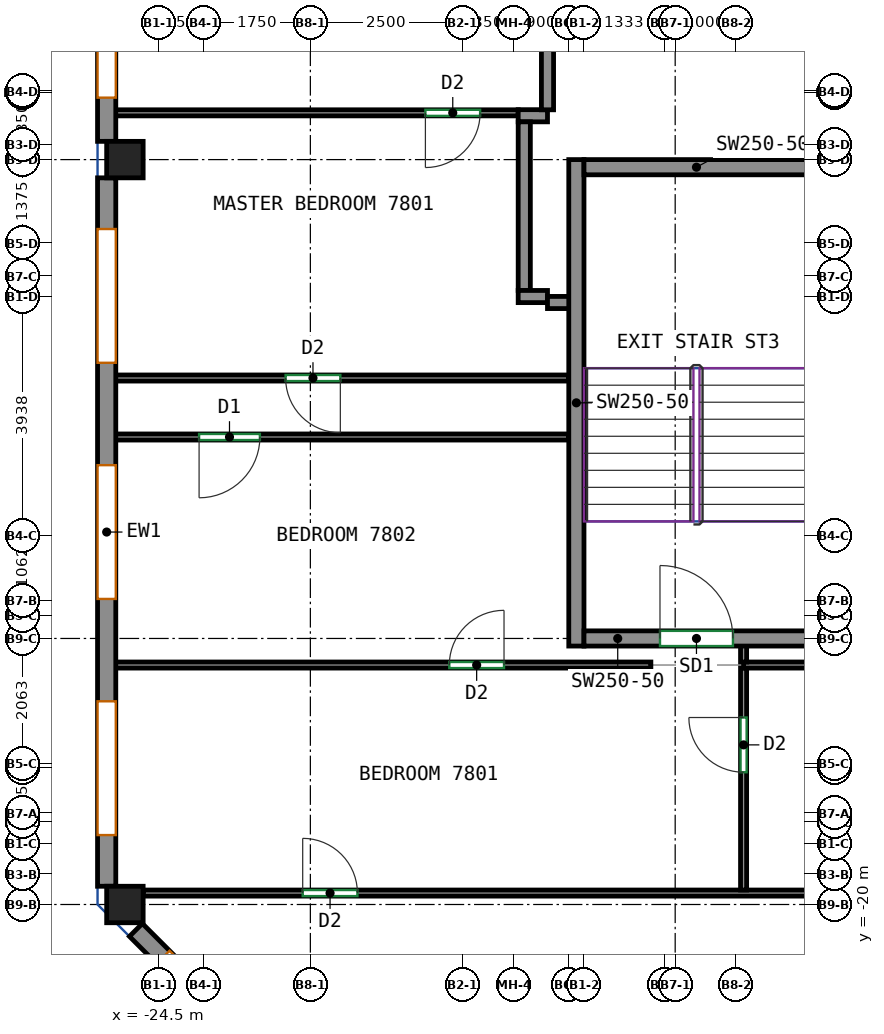
"""IFC4 building model, lengths in metres.
Left out: names, types, materials, properties, quantities, classifications, styles, units other than length and angle.
Written with IfcOpenShell. Run it as: python <this file> out.ifc"""

import sys

from ifc_helpers import new_model, si_unit, direction, frame, frame_2d, origin, origin_2d, place, context, subcontext, project, spatial, rectangle, extrude, source, transform, mapped, element, fill, save


model = new_model("IFC4")
c1 = context("Model", 3, precision=1e-05, world=origin(), true_north=direction((0.0, 1.0)))
c2 = subcontext(c1, "Body", "Model", "MODEL_VIEW")
j1 = project(units=[si_unit("LENGTHUNIT", "METRE"), si_unit("PLANEANGLEUNIT", "RADIAN")], contexts=[c1])
p1 = place(None, origin())
s1 = spatial("IfcSite", under=j1, at=p1, CompositionType="ELEMENT")
p2 = place(p1, origin())
s2 = spatial("IfcBuilding", under=s1, at=p2, CompositionType="ELEMENT")
p3 = place(p2, frame((0.0, 0.0, 312.0)))
s3 = spatial("IfcBuildingStorey", under=s2, at=p3, CompositionType="ELEMENT", Elevation=312.0)
m1 = source(origin(), c2, "Body", "SweptSolid", [
    extrude(rectangle(XDim=0.6, YDim=0.6, at=origin_2d()), origin(), (0.0, 0.0, 1.0), 3.12),
])
for number, where, z_axis, x_axis in (
    (1, (-25.05, -20.0, 0.0), (0.0, 0.0, 1.0), (1.0, 0.0, 0.0)),
    (2, (-25.05, -7.75, 0.0), (0.0, 0.0, 1.0), (1.0, 0.0, 0.0)),
):
    element("IfcColumn", number, at=place(p3, frame(where, z_axis=z_axis, x_axis=x_axis)), inside=s3, PredefinedType="COLUMN", context=c2, shape_type="MappedRepresentation", body=[
        mapped(m1, transform((0.0, 0.0, 0.0))),
    ])
m2 = source(origin(), c2, "Body", "SweptSolid", [
    extrude(rectangle(XDim=8.0, YDim=0.25, at=frame_2d((4.0, 0.0))), origin(), (0.0, 0.0, 1.0), 3.12),
])
p4 = place(p3, frame((-17.625, -15.75, 0.0), z_axis=(0.0, 0.0, 1.0), x_axis=(0.0, 1.0, 0.0)))
e3 = element("IfcWall", 3, at=p4, inside=s3, PredefinedType="SHEAR", context=c2, shape_type="MappedRepresentation", body=[
    mapped(m2, transform((0.0, 0.0, 0.0))),
])
m3 = source(origin(), c2, "Body", "SweptSolid", [
    extrude(rectangle(XDim=3.7, YDim=0.25, at=frame_2d((1.85, 0.0))), origin(), (0.0, 0.0, 1.0), 3.12),
])
p5 = place(p3, frame((-17.5, -15.625, 0.0), z_axis=(0.0, 0.0, 1.0), x_axis=(1.0, 0.0, 0.0)))
e4 = element("IfcWall", 4, at=p5, inside=s3, PredefinedType="SHEAR", context=c2, shape_type="MappedRepresentation", body=[
    mapped(m3, transform((0.0, 0.0, 0.0))),
])
p6 = place(p5, frame((1.25, 0.0, 0.0)))
e5 = element("IfcOpeningElement", 5, at=p6, cuts=e4, PredefinedType="OPENING", context=c2, shape_type="SweptSolid", body=[
    extrude(rectangle(XDim=1.2, YDim=2.1, at=frame_2d((0.6, 1.05))), frame((0.0, 0.135, 0.0), z_axis=(0.0, -1.0, 0.0), x_axis=(1.0, 0.0, 0.0)), (0.0, 0.0, 1.0), 0.27),
])
p7 = place(p3, frame((-17.5, -7.875, 0.0), z_axis=(0.0, 0.0, 1.0), x_axis=(1.0, 0.0, 0.0)))
e6 = element("IfcWall", 6, at=p7, inside=s3, PredefinedType="SHEAR", context=c2, shape_type="MappedRepresentation", body=[
    mapped(m3, transform((0.0, 0.0, 0.0))),
])
m4 = source(origin(), c2, "Body", "SweptSolid", [
    extrude(rectangle(XDim=7.275, YDim=0.3, at=frame_2d((3.637, 0.0))), origin(), (0.0, 0.0, 1.0), 3.12),
])
p8 = place(p3, frame((-25.35, -0.175, 0.0), z_axis=(0.0, 0.0, 1.0), x_axis=(0.0, -1.0, 0.0)))
e7 = element("IfcWall", 7, at=p8, inside=s3, PredefinedType="SOLIDWALL", context=c2, shape_type="MappedRepresentation", body=[
    mapped(m4, transform((0.0, 0.0, 0.0))),
])
p9 = place(p8, frame((0.719, 0.0, 0.8)))
e8 = element("IfcOpeningElement", 8, at=p9, cuts=e7, PredefinedType="OPENING", context=c2, shape_type="SweptSolid", body=[
    extrude(rectangle(XDim=2.2, YDim=2.05, at=frame_2d((1.1, 1.025))), frame((0.0, 0.16, 0.0), z_axis=(0.0, -1.0, 0.0), x_axis=(1.0, 0.0, 0.0)), (0.0, 0.0, 1.0), 0.32),
])
p10 = place(p8, frame((4.356, 0.0, 0.8)))
e9 = element("IfcOpeningElement", 9, at=p10, cuts=e7, PredefinedType="OPENING", context=c2, shape_type="SweptSolid", body=[
    extrude(rectangle(XDim=2.2, YDim=2.05, at=frame_2d((1.1, 1.025))), frame((0.0, 0.16, 0.0), z_axis=(0.0, -1.0, 0.0), x_axis=(1.0, 0.0, 0.0)), (0.0, 0.0, 1.0), 0.32),
])
m5 = source(origin(), c2, "Body", "SweptSolid", [
    extrude(rectangle(XDim=11.65, YDim=0.3, at=frame_2d((5.825, 0.0))), origin(), (0.0, 0.0, 1.0), 3.12),
])
p11 = place(p3, frame((-25.35, -8.05, 0.0), z_axis=(0.0, 0.0, 1.0), x_axis=(0.0, -1.0, 0.0)))
e10 = element("IfcWall", 10, at=p11, inside=s3, PredefinedType="SOLIDWALL", context=c2, shape_type="MappedRepresentation", body=[
    mapped(m5, transform((0.0, 0.0, 0.0))),
])
p12 = place(p11, frame((0.842, 0.0, 0.8)))
e11 = element("IfcOpeningElement", 11, at=p12, cuts=e10, PredefinedType="OPENING", context=c2, shape_type="SweptSolid", body=[
    extrude(rectangle(XDim=2.2, YDim=2.05, at=frame_2d((1.1, 1.025))), frame((0.0, 0.16, 0.0), z_axis=(0.0, -1.0, 0.0), x_axis=(1.0, 0.0, 0.0)), (0.0, 0.0, 1.0), 0.32),
])
p13 = place(p11, frame((4.725, 0.0, 0.8)))
e12 = element("IfcOpeningElement", 12, at=p13, cuts=e10, PredefinedType="OPENING", context=c2, shape_type="SweptSolid", body=[
    extrude(rectangle(XDim=2.2, YDim=2.05, at=frame_2d((1.1, 1.025))), frame((0.0, 0.16, 0.0), z_axis=(0.0, -1.0, 0.0), x_axis=(1.0, 0.0, 0.0)), (0.0, 0.0, 1.0), 0.32),
])
p14 = place(p11, frame((8.608, 0.0, 0.8)))
e13 = element("IfcOpeningElement", 13, at=p14, cuts=e10, PredefinedType="OPENING", context=c2, shape_type="SweptSolid", body=[
    extrude(rectangle(XDim=2.2, YDim=2.05, at=frame_2d((1.1, 1.025))), frame((0.0, 0.16, 0.0), z_axis=(0.0, -1.0, 0.0), x_axis=(1.0, 0.0, 0.0)), (0.0, 0.0, 1.0), 0.32),
])
m6 = source(origin(), c2, "Body", "SweptSolid", [
    extrude(rectangle(XDim=3.465, YDim=0.3, at=frame_2d((1.732, 0.0))), origin(), (0.0, 0.0, 1.0), 3.12),
])
p15 = place(p3, frame((-24.869, -20.419, 0.0), z_axis=(0.0, 0.0, 1.0), x_axis=(0.707106781187, -0.707106781187, 0.0)))
e14 = element("IfcWall", 14, at=p15, inside=s3, PredefinedType="SOLIDWALL", context=c2, shape_type="MappedRepresentation", body=[
    mapped(m6, transform((0.0, 0.0, 0.0))),
])
p16 = place(p15, frame((0.632, 0.0, 0.8)))
e15 = element("IfcOpeningElement", 15, at=p16, cuts=e14, PredefinedType="OPENING", context=c2, shape_type="SweptSolid", body=[
    extrude(rectangle(XDim=2.2, YDim=2.05, at=frame_2d((1.1, 1.025))), frame((0.0, 0.16, 0.0), z_axis=(0.0, -1.0, 0.0), x_axis=(1.0, 0.0, 0.0)), (0.0, 0.0, 1.0), 0.32),
])
p17 = place(p3, frame((-24.75, -19.812, 0.0), z_axis=(0.0, 0.0, 1.0), x_axis=(1.0, 0.0, 0.0)))
e16 = element("IfcWall", 16, at=p17, inside=s3, PredefinedType="PARTITIONING", context=c2, shape_type="SweptSolid", body=[
    extrude(rectangle(XDim=20.35, YDim=0.1, at=frame_2d((10.175, 0.0))), origin(), (0.0, 0.0, 1.0), 3.12),
])
p18 = place(p17, frame((2.624, 0.0, 0.0)))
e17 = element("IfcOpeningElement", 17, at=p18, cuts=e16, PredefinedType="OPENING", context=c2, shape_type="SweptSolid", body=[
    extrude(rectangle(XDim=0.9, YDim=2.1, at=frame_2d((0.45, 1.05))), frame((0.0, 0.06, 0.0), z_axis=(0.0, -1.0, 0.0), x_axis=(1.0, 0.0, 0.0)), (0.0, 0.0, 1.0), 0.12),
])
p19 = place(p3, frame((-14.875, -19.762, 0.0), z_axis=(0.0, 0.0, 1.0), x_axis=(0.0, 1.0, 0.0)))
e18 = element("IfcWall", 18, at=p19, inside=s3, PredefinedType="PARTITIONING", context=c2, shape_type="SweptSolid", body=[
    extrude(rectangle(XDim=3.65, YDim=0.1, at=frame_2d((1.825, 0.0))), origin(), (0.0, 0.0, 1.0), 3.12),
])
p20 = place(p19, frame((1.937, 0.0, 0.0)))
e19 = element("IfcOpeningElement", 19, at=p20, cuts=e18, PredefinedType="OPENING", context=c2, shape_type="SweptSolid", body=[
    extrude(rectangle(XDim=0.9, YDim=2.1, at=frame_2d((0.45, 1.05))), frame((0.0, 0.06, 0.0), z_axis=(0.0, -1.0, 0.0), x_axis=(1.0, 0.0, 0.0)), (0.0, 0.0, 1.0), 0.12),
])
p21 = place(p3, frame((-25.25, -16.062, 0.0), z_axis=(0.0, 0.0, 1.0), x_axis=(1.0, 0.0, 0.0)))
e20 = element("IfcWall", 20, at=p21, inside=s3, PredefinedType="PARTITIONING", context=c2, shape_type="SweptSolid", body=[
    extrude(rectangle(XDim=8.85, YDim=0.1, at=frame_2d((4.425, 0.0))), origin(), (0.0, 0.0, 1.0), 3.12),
])
p22 = place(p21, frame((5.535, 0.0, 0.0)))
e21 = element("IfcOpeningElement", 21, at=p22, cuts=e20, PredefinedType="OPENING", context=c2, shape_type="SweptSolid", body=[
    extrude(rectangle(XDim=0.9, YDim=2.1, at=frame_2d((0.45, 1.05))), frame((0.0, 0.06, 0.0), z_axis=(0.0, -1.0, 0.0), x_axis=(1.0, 0.0, 0.0)), (0.0, 0.0, 1.0), 0.12),
])
p23 = place(p3, frame((-14.875, -16.062, 0.0), z_axis=(0.0, 0.0, 1.0), x_axis=(1.0, 0.0, 0.0)))
e22 = element("IfcWall", 22, at=p23, inside=s3, PredefinedType="PARTITIONING", context=c2, shape_type="SweptSolid", body=[
    extrude(rectangle(XDim=6.45, YDim=0.1, at=frame_2d((3.225, 0.0))), origin(), (0.0, 0.0, 1.0), 3.12),
])
p24 = place(p23, frame((1.614, 0.0, 0.0)))
e23 = element("IfcOpeningElement", 23, at=p24, cuts=e22, PredefinedType="OPENING", context=c2, shape_type="SweptSolid", body=[
    extrude(rectangle(XDim=0.9, YDim=2.1, at=frame_2d((0.45, 1.05))), frame((0.0, 0.06, 0.0), z_axis=(0.0, -1.0, 0.0), x_axis=(1.0, 0.0, 0.0)), (0.0, 0.0, 1.0), 0.12),
])
p25 = place(p3, frame((-14.875, -16.012, 0.0), z_axis=(0.0, 0.0, 1.0), x_axis=(0.0, 1.0, 0.0)))
e24 = element("IfcWall", 24, at=p25, inside=s3, PredefinedType="PARTITIONING", context=c2, shape_type="SweptSolid", body=[
    extrude(rectangle(XDim=0.312, YDim=0.1, at=frame_2d((0.156, 0.0))), origin(), (0.0, 0.0, 1.0), 3.12),
])
p26 = place(p3, frame((-17.75, -12.312, 0.0), z_axis=(0.0, 0.0, 1.0), x_axis=(-1.0, 0.0, 0.0)))
e25 = element("IfcWall", 25, at=p26, inside=s3, PredefinedType="PARTITIONING", context=c2, shape_type="SweptSolid", body=[
    extrude(rectangle(XDim=7.5, YDim=0.1, at=frame_2d((3.75, 0.0))), origin(), (0.0, 0.0, 1.0), 3.12),
])
p27 = place(p26, frame((5.08, 0.0, 0.0)))
e26 = element("IfcOpeningElement", 26, at=p27, cuts=e25, PredefinedType="OPENING", context=c2, shape_type="SweptSolid", body=[
    extrude(rectangle(XDim=1.0, YDim=2.1, at=frame_2d((0.5, 1.05))), frame((0.0, 0.06, 0.0), z_axis=(0.0, -1.0, 0.0), x_axis=(1.0, 0.0, 0.0)), (0.0, 0.0, 1.0), 0.12),
])
p28 = place(p3, frame((-17.75, -11.342, 0.0), z_axis=(0.0, 0.0, 1.0), x_axis=(-1.0, 0.0, 0.0)))
e27 = element("IfcWall", 27, at=p28, inside=s3, PredefinedType="PARTITIONING", context=c2, shape_type="SweptSolid", body=[
    extrude(rectangle(XDim=7.5, YDim=0.1, at=frame_2d((3.75, 0.0))), origin(), (0.0, 0.0, 1.0), 3.12),
])
p29 = place(p28, frame((3.757, 0.0, 0.0)))
e28 = element("IfcOpeningElement", 28, at=p29, cuts=e27, PredefinedType="OPENING", context=c2, shape_type="SweptSolid", body=[
    extrude(rectangle(XDim=0.9, YDim=2.1, at=frame_2d((0.45, 1.05))), frame((0.0, 0.06, 0.0), z_axis=(0.0, -1.0, 0.0), x_axis=(1.0, 0.0, 0.0)), (0.0, 0.0, 1.0), 0.12),
])
p30 = place(p3, frame((-18.582, -6.981, 0.0), z_axis=(0.0, 0.0, 1.0), x_axis=(-1.0, 0.0, 0.0)))
e29 = element("IfcWall", 29, at=p30, inside=s3, PredefinedType="PARTITIONING", context=c2, shape_type="SweptSolid", body=[
    extrude(rectangle(XDim=6.668, YDim=0.1, at=frame_2d((3.334, 0.0))), origin(), (0.0, 0.0, 1.0), 3.12),
])
p31 = place(p30, frame((0.626, 0.0, 0.0)))
e30 = element("IfcOpeningElement", 30, at=p31, cuts=e29, PredefinedType="OPENING", context=c2, shape_type="SweptSolid", body=[
    extrude(rectangle(XDim=0.9, YDim=2.1, at=frame_2d((0.45, 1.05))), frame((0.0, 0.06, 0.0), z_axis=(0.0, -1.0, 0.0), x_axis=(1.0, 0.0, 0.0)), (0.0, 0.0, 1.0), 0.12),
])
p32 = place(p3, frame((-18.582, -7.029, 0.0), z_axis=(0.0, 0.0, 1.0), x_axis=(1.0, 0.0, 0.0)))
e31 = element("IfcWall", 31, at=p32, inside=s3, PredefinedType="PARTITIONING", context=c2, shape_type="SweptSolid", body=[
    extrude(rectangle(XDim=0.482, YDim=0.2, at=frame_2d((0.241, 0.0))), origin(), (0.0, 0.0, 1.0), 3.12),
])
p33 = place(p3, frame((-18.482, -9.902, 0.0), z_axis=(0.0, 0.0, 1.0), x_axis=(0.0, 1.0, 0.0)))
e32 = element("IfcWall", 32, at=p33, inside=s3, PredefinedType="PARTITIONING", context=c2, shape_type="SweptSolid", body=[
    extrude(rectangle(XDim=2.773, YDim=0.2, at=frame_2d((1.387, 0.0))), origin(), (0.0, 0.0, 1.0), 3.12),
])
p34 = place(p3, frame((-18.1, -10.002, 0.0), z_axis=(0.0, 0.0, 1.0), x_axis=(-1.0, 0.0, 0.0)))
e33 = element("IfcWall", 33, at=p34, inside=s3, PredefinedType="PARTITIONING", context=c2, shape_type="SweptSolid", body=[
    extrude(rectangle(XDim=0.482, YDim=0.2, at=frame_2d((0.241, 0.0))), origin(), (0.0, 0.0, 1.0), 3.12),
])
p35 = place(p3, frame((-17.7, -10.1, 0.0), z_axis=(0.0, 0.0, 1.0), x_axis=(-1.0, 0.0, 0.0)))
e34 = element("IfcWall", 34, at=p35, inside=s3, PredefinedType="PARTITIONING", context=c2, shape_type="SweptSolid", body=[
    extrude(rectangle(XDim=0.4, YDim=0.2, at=frame_2d((0.2, 0.0))), origin(), (0.0, 0.0, 1.0), 3.12),
])
p36 = place(p3, frame((-18.1, -6.931, 0.0), z_axis=(0.0, 0.0, 1.0), x_axis=(0.0, 1.0, 0.0)))
e35 = element("IfcWall", 35, at=p36, inside=s3, PredefinedType="PARTITIONING", context=c2, shape_type="SweptSolid", body=[
    extrude(rectangle(XDim=7.693, YDim=0.2, at=frame_2d((3.846, 0.0))), origin(), (0.0, 0.0, 1.0), 3.12),
])
p37 = place(p10, origin())
e36 = element("IfcWindow", 36, at=p37, inside=s3, PartitioningType="SINGLE_PANEL", PredefinedType="WINDOW", context=c2, shape_type="SweptSolid", body=[
    extrude(rectangle(XDim=2.2, YDim=2.05, at=frame_2d((1.1, 1.025))), frame((0.0, 0.03, 0.0), z_axis=(0.0, -1.0, 0.0), x_axis=(1.0, 0.0, 0.0)), (0.0, 0.0, 1.0), 0.06),
])
fill(e9, e36)
p38 = place(p12, origin())
e37 = element("IfcWindow", 37, at=p38, inside=s3, PartitioningType="SINGLE_PANEL", PredefinedType="WINDOW", context=c2, shape_type="SweptSolid", body=[
    extrude(rectangle(XDim=2.2, YDim=2.05, at=frame_2d((1.1, 1.025))), frame((0.0, 0.03, 0.0), z_axis=(0.0, -1.0, 0.0), x_axis=(1.0, 0.0, 0.0)), (0.0, 0.0, 1.0), 0.06),
])
fill(e11, e37)
p39 = place(p13, origin())
e38 = element("IfcWindow", 38, at=p39, inside=s3, PartitioningType="SINGLE_PANEL", PredefinedType="WINDOW", context=c2, shape_type="SweptSolid", body=[
    extrude(rectangle(XDim=2.2, YDim=2.05, at=frame_2d((1.1, 1.025))), frame((0.0, 0.03, 0.0), z_axis=(0.0, -1.0, 0.0), x_axis=(1.0, 0.0, 0.0)), (0.0, 0.0, 1.0), 0.06),
])
fill(e12, e38)
p40 = place(p14, origin())
e39 = element("IfcWindow", 39, at=p40, inside=s3, PartitioningType="SINGLE_PANEL", PredefinedType="WINDOW", context=c2, shape_type="SweptSolid", body=[
    extrude(rectangle(XDim=2.2, YDim=2.05, at=frame_2d((1.1, 1.025))), frame((0.0, 0.03, 0.0), z_axis=(0.0, -1.0, 0.0), x_axis=(1.0, 0.0, 0.0)), (0.0, 0.0, 1.0), 0.06),
])
fill(e13, e39)
p41 = place(p6, origin())
e40 = element("IfcDoor", 40, at=p41, inside=s3, OperationType="DOUBLE_DOOR_SINGLE_SWING", PredefinedType="DOOR", context=c2, shape_type="SweptSolid", body=[
    extrude(rectangle(XDim=1.2, YDim=2.1, at=frame_2d((0.6, 1.05))), frame((0.0, 0.025, 0.0), z_axis=(0.0, -1.0, 0.0), x_axis=(1.0, 0.0, 0.0)), (0.0, 0.0, 1.0), 0.05),
])
fill(e5, e40)
p42 = place(p18, origin())
e41 = element("IfcDoor", 41, at=p42, inside=s3, OperationType="SINGLE_SWING_LEFT", PredefinedType="DOOR", context=c2, shape_type="SweptSolid", body=[
    extrude(rectangle(XDim=0.9, YDim=2.1, at=frame_2d((0.45, 1.05))), frame((0.0, 0.025, 0.0), z_axis=(0.0, -1.0, 0.0), x_axis=(1.0, 0.0, 0.0)), (0.0, 0.0, 1.0), 0.05),
])
fill(e17, e41)
p43 = place(p20, origin())
e42 = element("IfcDoor", 42, at=p43, inside=s3, OperationType="SINGLE_SWING_RIGHT", PredefinedType="DOOR", context=c2, shape_type="SweptSolid", body=[
    extrude(rectangle(XDim=0.9, YDim=2.1, at=frame_2d((0.45, 1.05))), frame((0.0, 0.025, 0.0), z_axis=(0.0, -1.0, 0.0), x_axis=(1.0, 0.0, 0.0)), (0.0, 0.0, 1.0), 0.05),
])
fill(e19, e42)
p44 = place(p22, origin())
e43 = element("IfcDoor", 43, at=p44, inside=s3, OperationType="SINGLE_SWING_RIGHT", PredefinedType="DOOR", context=c2, shape_type="SweptSolid", body=[
    extrude(rectangle(XDim=0.9, YDim=2.1, at=frame_2d((0.45, 1.05))), frame((0.0, 0.025, 0.0), z_axis=(0.0, -1.0, 0.0), x_axis=(1.0, 0.0, 0.0)), (0.0, 0.0, 1.0), 0.05),
])
fill(e21, e43)
p45 = place(p27, origin())
e44 = element("IfcDoor", 44, at=p45, inside=s3, OperationType="SINGLE_SWING_RIGHT", PredefinedType="DOOR", context=c2, shape_type="SweptSolid", body=[
    extrude(rectangle(XDim=1.0, YDim=2.1, at=frame_2d((0.5, 1.05))), frame((0.0, 0.025, 0.0), z_axis=(0.0, -1.0, 0.0), x_axis=(1.0, 0.0, 0.0)), (0.0, 0.0, 1.0), 0.05),
])
fill(e26, e44)
p46 = place(p29, origin())
e45 = element("IfcDoor", 45, at=p46, inside=s3, OperationType="SINGLE_SWING_LEFT", PredefinedType="DOOR", context=c2, shape_type="SweptSolid", body=[
    extrude(rectangle(XDim=0.9, YDim=2.1, at=frame_2d((0.45, 1.05))), frame((0.0, 0.025, 0.0), z_axis=(0.0, -1.0, 0.0), x_axis=(1.0, 0.0, 0.0)), (0.0, 0.0, 1.0), 0.05),
])
fill(e28, e45)
p47 = place(p31, origin())
e46 = element("IfcDoor", 46, at=p47, inside=s3, OperationType="SINGLE_SWING_RIGHT", PredefinedType="DOOR", context=c2, shape_type="SweptSolid", body=[
    extrude(rectangle(XDim=0.9, YDim=2.1, at=frame_2d((0.45, 1.05))), frame((0.0, 0.025, 0.0), z_axis=(0.0, -1.0, 0.0), x_axis=(1.0, 0.0, 0.0)), (0.0, 0.0, 1.0), 0.05),
])
fill(e30, e46)
save(model, sys.argv[1])
